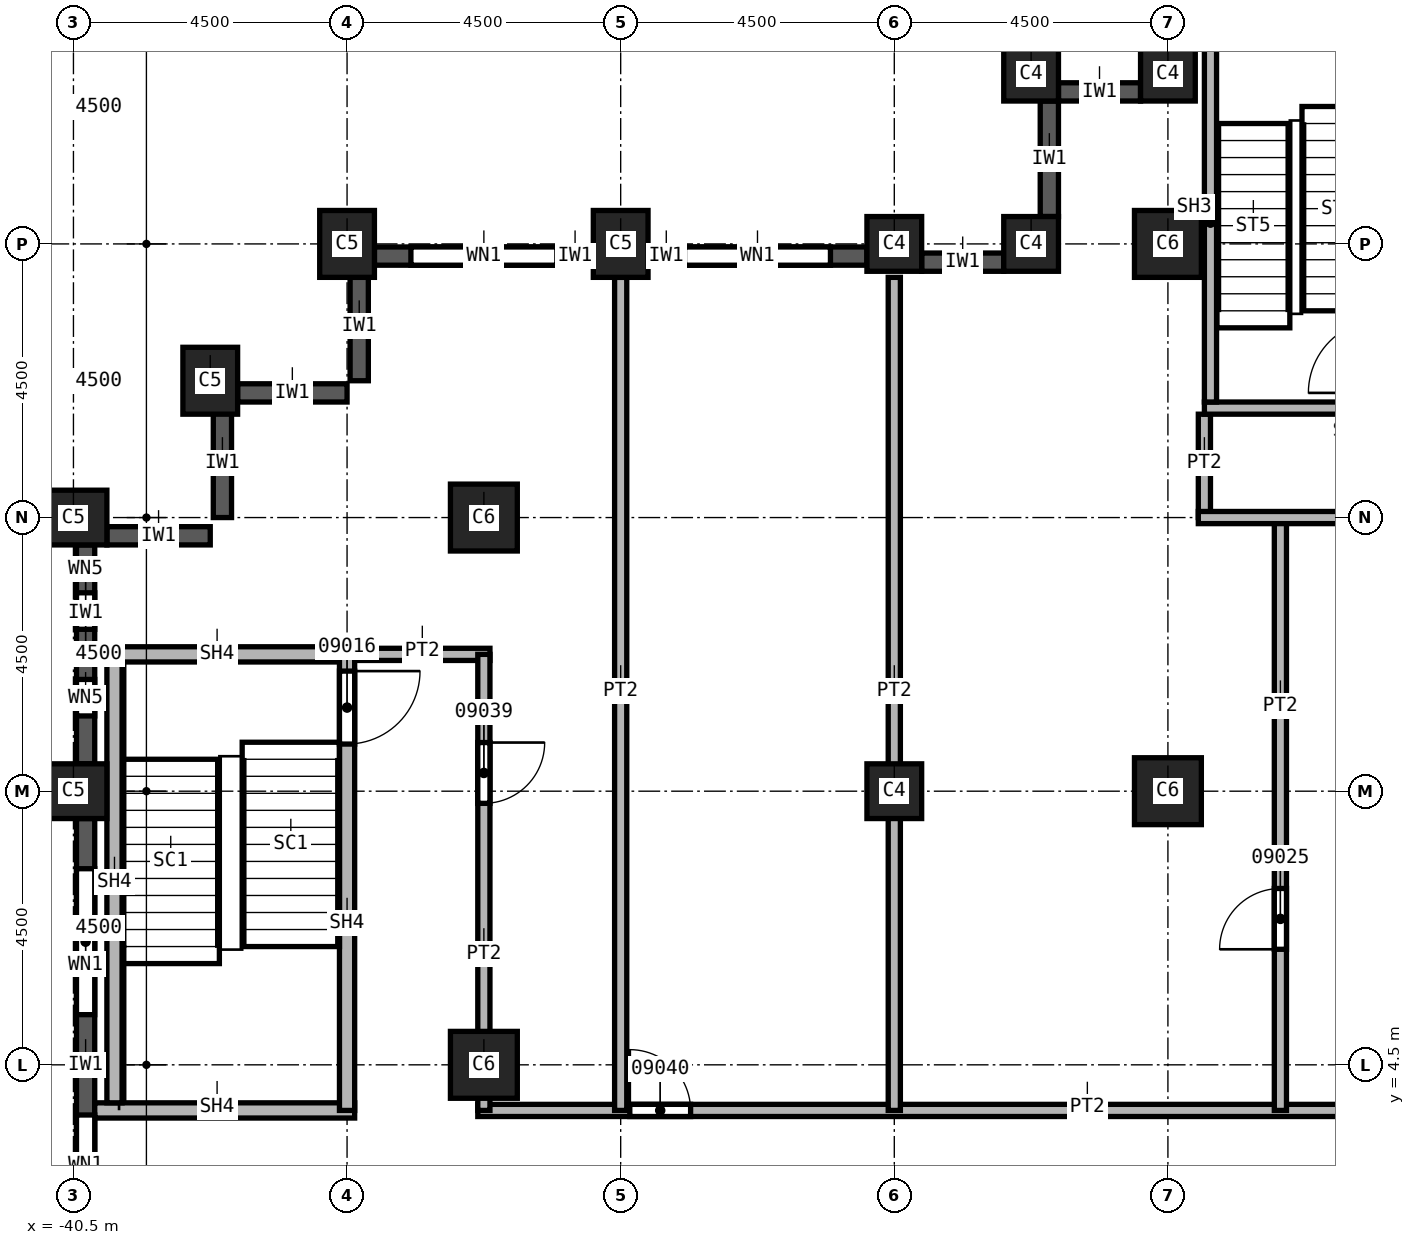
"""IFC4 building model, lengths in metres.
Left out: names, types, materials, properties, quantities, classifications, styles, units other than length and angle.
Written with IfcOpenShell. Run it as: python <this file> out.ifc"""

import sys

from ifc_helpers import new_model, si_unit, direction, frame, frame_2d, origin, origin_2d, place, context, subcontext, project, spatial, rectangle, extrude, element, fill, save


model = new_model("IFC4")
c1 = context("Model", 3, precision=1e-05, world=origin(), true_north=direction((0.0, 1.0)))
c2 = subcontext(c1, "Body", "Model", "MODEL_VIEW")
j1 = project(units=[si_unit("LENGTHUNIT", "METRE"), si_unit("PLANEANGLEUNIT", "RADIAN")], contexts=[c1])
p1 = place(None, origin())
s1 = spatial("IfcSite", under=j1, at=p1, CompositionType="ELEMENT")
p2 = place(p1, origin())
s2 = spatial("IfcBuilding", under=s1, at=p2, CompositionType="ELEMENT")
p3 = place(p2, frame((0.0, 0.0, 162.0)))
s3 = spatial("IfcBuildingStorey", under=s2, at=p3, CompositionType="ELEMENT", Elevation=162.0)
for number, where, z_axis, x_axis in (
    (1, (-40.5, 9.0, 0.0), (0.0, 0.0, 1.0), (0.0, 1.0, 0.0)),
    (2, (-40.5, 13.5, 0.0), (0.0, 0.0, 1.0), (0.0, 1.0, 0.0)),
    (3, (-38.25, 15.75, 0.0), (0.0, 0.0, 1.0), (1.0, 0.0, 0.0)),
    (4, (-31.5, 18.0, 0.0), (0.0, 0.0, 1.0), (1.0, 0.0, 0.0)),
    (5, (-36.0, 18.0, 0.0), (0.0, 0.0, 1.0), (1.0, 0.0, 0.0)),
):
    element("IfcColumn", number, at=place(p3, frame(where, z_axis=z_axis, x_axis=x_axis)), inside=s3, PredefinedType="COLUMN", context=c2, shape_type="SweptSolid", body=[
        extrude(rectangle(XDim=0.9, YDim=1.1, at=origin_2d()), origin(), (0.0, 0.0, 1.0), 3.7),
    ])
for number, where, z_axis, x_axis in (
    (6, (-33.75, 4.5, 0.0), (0.0, 0.0, 1.0), (1.0, 0.0, 0.0)),
    (7, (-33.75, 13.5, 0.0), (0.0, 0.0, 1.0), (1.0, 0.0, 0.0)),
    (8, (-22.5, 9.0, 0.0), (0.0, 0.0, 1.0), (1.0, 0.0, 0.0)),
    (9, (-22.5, 18.0, 0.0), (0.0, 0.0, 1.0), (1.0, 0.0, 0.0)),
):
    element("IfcColumn", number, at=place(p3, frame(where, z_axis=z_axis, x_axis=x_axis)), inside=s3, PredefinedType="COLUMN", context=c2, shape_type="SweptSolid", body=[
        extrude(rectangle(XDim=1.1, YDim=1.1, at=origin_2d()), origin(), (0.0, 0.0, 1.0), 3.7),
    ])
for number, where, z_axis, x_axis in (
    (10, (-27.0, 9.0, 0.0), (0.0, 0.0, 1.0), (1.0, 0.0, 0.0)),
    (11, (-27.0, 18.0, 0.0), (0.0, 0.0, 1.0), (1.0, 0.0, 0.0)),
    (12, (-22.5, 20.8, 0.0), (0.0, 0.0, 1.0), (1.0, 0.0, 0.0)),
    (13, (-24.75, 20.8, 0.0), (0.0, 0.0, 1.0), (1.0, 0.0, 0.0)),
    (14, (-24.75, 18.0, 0.0), (0.0, 0.0, 1.0), (1.0, 0.0, 0.0)),
):
    element("IfcColumn", number, at=place(p3, frame(where, z_axis=z_axis, x_axis=x_axis)), inside=s3, PredefinedType="COLUMN", context=c2, shape_type="SweptSolid", body=[
        extrude(rectangle(XDim=0.9, YDim=0.9, at=origin_2d()), origin(), (0.0, 0.0, 1.0), 3.7),
    ])
for number, where, z_axis, x_axis in (
    (15, (-35.8, 17.55, 0.0), (0.0, 0.0, 1.0), (0.0, -1.0, 0.0)),
    (16, (-37.8, 15.55, 0.0), (0.0, 0.0, 1.0), (1.0, 0.0, 0.0)),
    (17, (-38.05, 15.3, 0.0), (0.0, 0.0, 1.0), (0.0, -1.0, 0.0)),
):
    element("IfcWall", number, at=place(p3, frame(where, z_axis=z_axis, x_axis=x_axis)), inside=s3, PredefinedType="SOLIDWALL", context=c2, shape_type="SweptSolid", body=[
        extrude(rectangle(XDim=1.8, YDim=0.3, at=frame_2d((0.9, 0.0))), origin(), (0.0, 0.0, 1.0), 3.1),
    ])
p4 = place(p3, frame((-39.95, 13.2, 0.0), z_axis=(0.0, 0.0, 1.0), x_axis=(1.0, 0.0, 0.0)))
e18 = element("IfcWall", 18, at=p4, inside=s3, PredefinedType="SOLIDWALL", context=c2, shape_type="SweptSolid", body=[
    extrude(rectangle(XDim=1.7, YDim=0.3, at=frame_2d((0.85, 0.0))), origin(), (0.0, 0.0, 1.0), 3.1),
])
p5 = place(p3, frame((-22.95, 20.5, 0.0), z_axis=(0.0, 0.0, 1.0), x_axis=(-1.0, 0.0, 0.0)))
e19 = element("IfcWall", 19, at=p5, inside=s3, PredefinedType="SOLIDWALL", context=c2, shape_type="SweptSolid", body=[
    extrude(rectangle(XDim=1.35, YDim=0.3, at=frame_2d((0.675, 0.0))), origin(), (0.0, 0.0, 1.0), 3.1),
])
p6 = place(p3, frame((-24.45, 20.35, 0.0), z_axis=(0.0, 0.0, 1.0), x_axis=(0.0, -1.0, 0.0)))
e20 = element("IfcWall", 20, at=p6, inside=s3, PredefinedType="SOLIDWALL", context=c2, shape_type="SweptSolid", body=[
    extrude(rectangle(XDim=1.9, YDim=0.3, at=frame_2d((0.95, 0.0))), origin(), (0.0, 0.0, 1.0), 3.1),
])
p7 = place(p3, frame((-25.2, 17.7, 0.0), z_axis=(0.0, 0.0, 1.0), x_axis=(-1.0, 0.0, 0.0)))
e21 = element("IfcWall", 21, at=p7, inside=s3, PredefinedType="SOLIDWALL", context=c2, shape_type="SweptSolid", body=[
    extrude(rectangle(XDim=1.35, YDim=0.3, at=frame_2d((0.675, 0.0))), origin(), (0.0, 0.0, 1.0), 3.1),
])
p8 = place(p3, frame((-27.45, 17.8, 0.0), z_axis=(0.0, 0.0, 1.0), x_axis=(-1.0, 0.0, 0.0)))
e22 = element("IfcWall", 22, at=p8, inside=s3, PredefinedType="SOLIDWALL", context=c2, shape_type="SweptSolid", body=[
    extrude(rectangle(XDim=3.6, YDim=0.3, at=frame_2d((1.8, 0.0))), origin(), (0.0, 0.0, 1.0), 3.1),
])
p9 = place(p8, frame((0.6, 0.0, 0.8)))
e23 = element("IfcOpeningElement", 23, at=p9, cuts=e22, PredefinedType="OPENING", context=c2, shape_type="SweptSolid", body=[
    extrude(rectangle(XDim=2.4, YDim=1.95, at=frame_2d((1.2, 0.975))), frame((0.0, 0.15, 0.0), z_axis=(0.0, -1.0, 0.0), x_axis=(1.0, 0.0, 0.0)), (0.0, 0.0, 1.0), 0.3),
])
p10 = place(p3, frame((-31.95, 17.8, 0.0), z_axis=(0.0, 0.0, 1.0), x_axis=(-1.0, 0.0, 0.0)))
e24 = element("IfcWall", 24, at=p10, inside=s3, PredefinedType="SOLIDWALL", context=c2, shape_type="SweptSolid", body=[
    extrude(rectangle(XDim=3.6, YDim=0.3, at=frame_2d((1.8, 0.0))), origin(), (0.0, 0.0, 1.0), 3.1),
])
p11 = place(p10, frame((0.6, 0.0, 0.8)))
e25 = element("IfcOpeningElement", 25, at=p11, cuts=e24, PredefinedType="OPENING", context=c2, shape_type="SweptSolid", body=[
    extrude(rectangle(XDim=2.4, YDim=1.95, at=frame_2d((1.2, 0.975))), frame((0.0, 0.15, 0.0), z_axis=(0.0, -1.0, 0.0), x_axis=(1.0, 0.0, 0.0)), (0.0, 0.0, 1.0), 0.3),
])
p12 = place(p3, frame((-40.3, 13.05, 0.0), z_axis=(0.0, 0.0, 1.0), x_axis=(0.0, -1.0, 0.0)))
e26 = element("IfcWall", 26, at=p12, inside=s3, PredefinedType="SOLIDWALL", context=c2, shape_type="SweptSolid", body=[
    extrude(rectangle(XDim=3.6, YDim=0.3, at=frame_2d((1.8, 0.0))), origin(), (0.0, 0.0, 1.0), 3.1),
])
p13 = place(p12, frame((0.788, 0.0, 0.8)))
e27 = element("IfcOpeningElement", 27, at=p13, cuts=e26, PredefinedType="OPENING", context=c2, shape_type="SweptSolid", body=[
    extrude(rectangle(XDim=0.6, YDim=1.95, at=frame_2d((0.3, 0.975))), frame((0.0, 0.15, 0.0), z_axis=(0.0, -1.0, 0.0), x_axis=(1.0, 0.0, 0.0)), (0.0, 0.0, 1.0), 0.3),
])
p14 = place(p12, frame((2.212, 0.0, 0.8)))
e28 = element("IfcOpeningElement", 28, at=p14, cuts=e26, PredefinedType="OPENING", context=c2, shape_type="SweptSolid", body=[
    extrude(rectangle(XDim=0.6, YDim=1.95, at=frame_2d((0.3, 0.975))), frame((0.0, 0.15, 0.0), z_axis=(0.0, -1.0, 0.0), x_axis=(1.0, 0.0, 0.0)), (0.0, 0.0, 1.0), 0.3),
])
p15 = place(p3, frame((-40.3, 8.55, 0.0), z_axis=(0.0, 0.0, 1.0), x_axis=(0.0, -1.0, 0.0)))
e29 = element("IfcWall", 29, at=p15, inside=s3, PredefinedType="SOLIDWALL", context=c2, shape_type="SweptSolid", body=[
    extrude(rectangle(XDim=8.1, YDim=0.3, at=frame_2d((4.05, 0.0))), origin(), (0.0, 0.0, 1.0), 3.1),
])
p16 = place(p15, frame((0.825, 0.0, 0.8)))
e30 = element("IfcOpeningElement", 30, at=p16, cuts=e29, PredefinedType="OPENING", context=c2, shape_type="SweptSolid", body=[
    extrude(rectangle(XDim=2.4, YDim=1.95, at=frame_2d((1.2, 0.975))), frame((0.0, 0.15, 0.0), z_axis=(0.0, -1.0, 0.0), x_axis=(1.0, 0.0, 0.0)), (0.0, 0.0, 1.0), 0.3),
])
p17 = place(p15, frame((4.875, 0.0, 0.8)))
e31 = element("IfcOpeningElement", 31, at=p17, cuts=e29, PredefinedType="OPENING", context=c2, shape_type="SweptSolid", body=[
    extrude(rectangle(XDim=2.4, YDim=1.95, at=frame_2d((1.2, 0.975))), frame((0.0, 0.15, 0.0), z_axis=(0.0, -1.0, 0.0), x_axis=(1.0, 0.0, 0.0)), (0.0, 0.0, 1.0), 0.3),
])
p18 = place(p3, frame((-36.0, 11.25, 0.0), z_axis=(0.0, 0.0, 1.0), x_axis=(1.0, 0.0, 0.0)))
e32 = element("IfcWall", 32, at=p18, inside=s3, PredefinedType="PARTITIONING", context=c2, shape_type="SweptSolid", body=[
    extrude(rectangle(XDim=2.35, YDim=0.2, at=frame_2d((1.175, 0.0))), origin(), (0.0, 0.0, 1.0), 3.7),
])
p19 = place(p3, frame((-33.85, 3.75, 0.0), z_axis=(0.0, 0.0, 1.0), x_axis=(1.0, 0.0, 0.0)))
e33 = element("IfcWall", 33, at=p19, inside=s3, PredefinedType="PARTITIONING", context=c2, shape_type="SweptSolid", body=[
    extrude(rectangle(XDim=18.45, YDim=0.2, at=frame_2d((9.225, 0.0))), origin(), (0.0, 0.0, 1.0), 3.7),
])
p20 = place(p19, frame((2.5, 0.0, 0.0)))
e34 = element("IfcOpeningElement", 34, at=p20, cuts=e33, PredefinedType="OPENING", context=c2, shape_type="SweptSolid", body=[
    extrude(rectangle(XDim=1.0, YDim=2.1, at=frame_2d((0.5, 1.05))), frame((0.0, 0.1, 0.0), z_axis=(0.0, -1.0, 0.0), x_axis=(1.0, 0.0, 0.0)), (0.0, 0.0, 1.0), 0.2),
])
p21 = place(p3, frame((-33.75, 11.25, 0.0), z_axis=(0.0, 0.0, 1.0), x_axis=(0.0, -1.0, 0.0)))
e35 = element("IfcWall", 35, at=p21, inside=s3, PredefinedType="PARTITIONING", context=c2, shape_type="SweptSolid", body=[
    extrude(rectangle(XDim=7.5, YDim=0.2, at=frame_2d((3.75, 0.0))), origin(), (0.0, 0.0, 1.0), 3.7),
])
p22 = place(p21, frame((1.45, 0.0, 0.0)))
e36 = element("IfcOpeningElement", 36, at=p22, cuts=e35, PredefinedType="OPENING", context=c2, shape_type="SweptSolid", body=[
    extrude(rectangle(XDim=1.0, YDim=2.1, at=frame_2d((0.5, 1.05))), frame((0.0, 0.1, 0.0), z_axis=(0.0, -1.0, 0.0), x_axis=(1.0, 0.0, 0.0)), (0.0, 0.0, 1.0), 0.2),
])
for number, where, z_axis, x_axis in (
    (37, (-31.5, 17.45, 0.0), (0.0, 0.0, 1.0), (0.0, -1.0, 0.0)),
    (38, (-27.0, 3.75, 0.0), (0.0, 0.0, 1.0), (0.0, 1.0, 0.0)),
):
    element("IfcWall", number, at=place(p3, frame(where, z_axis=z_axis, x_axis=x_axis)), inside=s3, PredefinedType="PARTITIONING", context=c2, shape_type="SweptSolid", body=[
        extrude(rectangle(XDim=13.7, YDim=0.2, at=frame_2d((6.85, 0.0))), origin(), (0.0, 0.0, 1.0), 3.7),
    ])
p23 = place(p3, frame((-21.9, 13.5, 0.0), z_axis=(0.0, 0.0, 1.0), x_axis=(0.0, 1.0, 0.0)))
e39 = element("IfcWall", 39, at=p23, inside=s3, PredefinedType="PARTITIONING", context=c2, shape_type="SweptSolid", body=[
    extrude(rectangle(XDim=1.7, YDim=0.2, at=frame_2d((0.85, 0.0))), origin(), (0.0, 0.0, 1.0), 3.7),
])
p24 = place(p3, frame((-20.65, 3.75, 0.0), z_axis=(0.0, 0.0, 1.0), x_axis=(0.0, 1.0, 0.0)))
e40 = element("IfcWall", 40, at=p24, inside=s3, PredefinedType="PARTITIONING", context=c2, shape_type="SweptSolid", body=[
    extrude(rectangle(XDim=9.75, YDim=0.2, at=frame_2d((4.875, 0.0))), origin(), (0.0, 0.0, 1.0), 3.7),
])
p25 = place(p24, frame((2.65, 0.0, 0.0)))
e41 = element("IfcOpeningElement", 41, at=p25, cuts=e40, PredefinedType="OPENING", context=c2, shape_type="SweptSolid", body=[
    extrude(rectangle(XDim=1.0, YDim=2.1, at=frame_2d((0.5, 1.05))), frame((0.0, 0.1, 0.0), z_axis=(0.0, -1.0, 0.0), x_axis=(1.0, 0.0, 0.0)), (0.0, 0.0, 1.0), 0.2),
])
p26 = place(p3, frame((-15.4, 13.5, 0.0), z_axis=(0.0, 0.0, 1.0), x_axis=(-1.0, 0.0, 0.0)))
e42 = element("IfcWall", 42, at=p26, inside=s3, PredefinedType="PARTITIONING", context=c2, shape_type="SweptSolid", body=[
    extrude(rectangle(XDim=6.6, YDim=0.2, at=frame_2d((3.3, 0.0))), origin(), (0.0, 0.0, 1.0), 3.7),
])
p27 = place(p3, frame((-40.15, 3.75, 0.0), z_axis=(0.0, 0.0, 1.0), x_axis=(1.0, 0.0, 0.0)))
e43 = element("IfcWall", 43, at=p27, inside=s3, PredefinedType="SOLIDWALL", context=c2, shape_type="SweptSolid", body=[
    extrude(rectangle(XDim=4.275, YDim=0.25, at=frame_2d((2.137, 0.0))), origin(), (0.0, 0.0, 1.0), 3.7),
])
p28 = place(p3, frame((-40.15, 11.25, 0.0), z_axis=(0.0, 0.0, 1.0), x_axis=(1.0, 0.0, 0.0)))
e44 = element("IfcWall", 44, at=p28, inside=s3, PredefinedType="SOLIDWALL", context=c2, shape_type="SweptSolid", body=[
    extrude(rectangle(XDim=4.15, YDim=0.25, at=frame_2d((2.075, 0.0))), origin(), (0.0, 0.0, 1.0), 3.7),
])
p29 = place(p3, frame((-36.0, 11.375, 0.0), z_axis=(0.0, 0.0, 1.0), x_axis=(0.0, -1.0, 0.0)))
e45 = element("IfcWall", 45, at=p29, inside=s3, PredefinedType="SOLIDWALL", context=c2, shape_type="SweptSolid", body=[
    extrude(rectangle(XDim=7.625, YDim=0.25, at=frame_2d((3.812, 0.0))), origin(), (0.0, 0.0, 1.0), 3.7),
])
p30 = place(p29, frame((0.4, 0.0, 0.0)))
e46 = element("IfcOpeningElement", 46, at=p30, cuts=e45, PredefinedType="OPENING", context=c2, shape_type="SweptSolid", body=[
    extrude(rectangle(XDim=1.2, YDim=2.1, at=frame_2d((0.6, 1.05))), frame((0.0, 0.125, 0.0), z_axis=(0.0, -1.0, 0.0), x_axis=(1.0, 0.0, 0.0)), (0.0, 0.0, 1.0), 0.25),
])
p31 = place(p3, frame((-21.9, 15.3, 0.0), z_axis=(0.0, 0.0, 1.0), x_axis=(1.0, 0.0, 0.0)))
e47 = element("IfcWall", 47, at=p31, inside=s3, PredefinedType="SOLIDWALL", context=c2, shape_type="SweptSolid", body=[
    extrude(rectangle(XDim=8.275, YDim=0.2, at=frame_2d((4.137, 0.0))), origin(), (0.0, 0.0, 1.0), 3.7),
])
p32 = place(p31, frame((4.8, 0.0, 0.0)))
e48 = element("IfcOpeningElement", 48, at=p32, cuts=e47, PredefinedType="OPENING", context=c2, shape_type="SweptSolid", body=[
    extrude(rectangle(XDim=1.2, YDim=2.1, at=frame_2d((0.6, 1.05))), frame((0.0, 0.1, 0.0), z_axis=(0.0, -1.0, 0.0), x_axis=(1.0, 0.0, 0.0)), (0.0, 0.0, 1.0), 0.2),
])
p33 = place(p3, frame((-21.8, 15.4, 0.0), z_axis=(0.0, 0.0, 1.0), x_axis=(0.0, 1.0, 0.0)))
e49 = element("IfcWall", 49, at=p33, inside=s3, PredefinedType="SOLIDWALL", context=c2, shape_type="SweptSolid", body=[
    extrude(rectangle(XDim=5.9, YDim=0.2, at=frame_2d((2.95, 0.0))), origin(), (0.0, 0.0, 1.0), 3.7),
])
p34 = place(p3, frame((-39.825, 3.875, 0.0), z_axis=(0.0, 0.0, 1.0), x_axis=(0.0, 1.0, 0.0)))
e50 = element("IfcWall", 50, at=p34, inside=s3, PredefinedType="SOLIDWALL", context=c2, shape_type="SweptSolid", body=[
    extrude(rectangle(XDim=7.25, YDim=0.25, at=frame_2d((3.625, 0.0))), origin(), (0.0, 0.0, 1.0), 3.7),
])
p35 = place(p9, origin())
e51 = element("IfcWindow", 51, at=p35, inside=s3, PartitioningType="SINGLE_PANEL", PredefinedType="WINDOW", context=c2, shape_type="SweptSolid", body=[
    extrude(rectangle(XDim=2.4, YDim=1.95, at=frame_2d((1.2, 0.975))), frame((0.0, 0.03, 0.0), z_axis=(0.0, -1.0, 0.0), x_axis=(1.0, 0.0, 0.0)), (0.0, 0.0, 1.0), 0.06),
])
fill(e23, e51)
p36 = place(p11, origin())
e52 = element("IfcWindow", 52, at=p36, inside=s3, PartitioningType="SINGLE_PANEL", PredefinedType="WINDOW", context=c2, shape_type="SweptSolid", body=[
    extrude(rectangle(XDim=2.4, YDim=1.95, at=frame_2d((1.2, 0.975))), frame((0.0, 0.03, 0.0), z_axis=(0.0, -1.0, 0.0), x_axis=(1.0, 0.0, 0.0)), (0.0, 0.0, 1.0), 0.06),
])
fill(e25, e52)
p37 = place(p16, origin())
e53 = element("IfcWindow", 53, at=p37, inside=s3, PartitioningType="SINGLE_PANEL", PredefinedType="WINDOW", context=c2, shape_type="SweptSolid", body=[
    extrude(rectangle(XDim=2.4, YDim=1.95, at=frame_2d((1.2, 0.975))), frame((0.0, 0.03, 0.0), z_axis=(0.0, -1.0, 0.0), x_axis=(1.0, 0.0, 0.0)), (0.0, 0.0, 1.0), 0.06),
])
fill(e30, e53)
p38 = place(p17, origin())
e54 = element("IfcWindow", 54, at=p38, inside=s3, PartitioningType="SINGLE_PANEL", PredefinedType="WINDOW", context=c2, shape_type="SweptSolid", body=[
    extrude(rectangle(XDim=2.4, YDim=1.95, at=frame_2d((1.2, 0.975))), frame((0.0, 0.03, 0.0), z_axis=(0.0, -1.0, 0.0), x_axis=(1.0, 0.0, 0.0)), (0.0, 0.0, 1.0), 0.06),
])
fill(e31, e54)
p39 = place(p30, origin())
e55 = element("IfcDoor", 55, at=p39, inside=s3, OperationType="SINGLE_SWING_LEFT", PredefinedType="DOOR", context=c2, shape_type="SweptSolid", body=[
    extrude(rectangle(XDim=1.2, YDim=2.1, at=frame_2d((0.6, 1.05))), frame((0.0, 0.025, 0.0), z_axis=(0.0, -1.0, 0.0), x_axis=(1.0, 0.0, 0.0)), (0.0, 0.0, 1.0), 0.05),
])
fill(e46, e55)
p40 = place(p25, origin())
e56 = element("IfcDoor", 56, at=p40, inside=s3, OperationType="SINGLE_SWING_RIGHT", PredefinedType="DOOR", context=c2, shape_type="SweptSolid", body=[
    extrude(rectangle(XDim=1.0, YDim=2.1, at=frame_2d((0.5, 1.05))), frame((0.0, 0.025, 0.0), z_axis=(0.0, -1.0, 0.0), x_axis=(1.0, 0.0, 0.0)), (0.0, 0.0, 1.0), 0.05),
])
fill(e41, e56)
p41 = place(p22, origin())
e57 = element("IfcDoor", 57, at=p41, inside=s3, OperationType="SINGLE_SWING_RIGHT", PredefinedType="DOOR", context=c2, shape_type="SweptSolid", body=[
    extrude(rectangle(XDim=1.0, YDim=2.1, at=frame_2d((0.5, 1.05))), frame((0.0, 0.025, 0.0), z_axis=(0.0, -1.0, 0.0), x_axis=(1.0, 0.0, 0.0)), (0.0, 0.0, 1.0), 0.05),
])
fill(e36, e57)
p42 = place(p20, origin())
e58 = element("IfcDoor", 58, at=p42, inside=s3, OperationType="SINGLE_SWING_LEFT", PredefinedType="DOOR", context=c2, shape_type="SweptSolid", body=[
    extrude(rectangle(XDim=1.0, YDim=2.1, at=frame_2d((0.5, 1.05))), frame((0.0, 0.025, 0.0), z_axis=(0.0, -1.0, 0.0), x_axis=(1.0, 0.0, 0.0)), (0.0, 0.0, 1.0), 0.05),
])
fill(e34, e58)
p43 = place(p13, origin())
e59 = element("IfcWindow", 59, at=p43, inside=s3, PartitioningType="SINGLE_PANEL", PredefinedType="WINDOW", context=c2, shape_type="SweptSolid", body=[
    extrude(rectangle(XDim=0.6, YDim=1.95, at=frame_2d((0.3, 0.975))), frame((0.0, 0.03, 0.0), z_axis=(0.0, -1.0, 0.0), x_axis=(1.0, 0.0, 0.0)), (0.0, 0.0, 1.0), 0.06),
])
fill(e27, e59)
p44 = place(p14, origin())
e60 = element("IfcWindow", 60, at=p44, inside=s3, PartitioningType="SINGLE_PANEL", PredefinedType="WINDOW", context=c2, shape_type="SweptSolid", body=[
    extrude(rectangle(XDim=0.6, YDim=1.95, at=frame_2d((0.3, 0.975))), frame((0.0, 0.03, 0.0), z_axis=(0.0, -1.0, 0.0), x_axis=(1.0, 0.0, 0.0)), (0.0, 0.0, 1.0), 0.06),
])
fill(e28, e60)
save(model, sys.argv[1])
